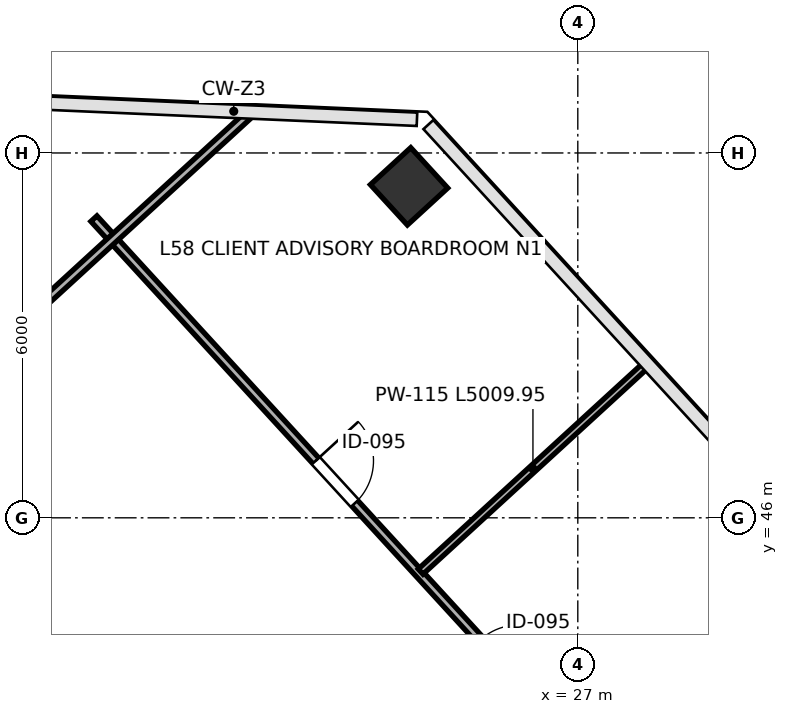
"""IFC4 building model, lengths in metres.
Left out: names, types, materials, properties, quantities, classifications, styles, units other than length and angle.
Written with IfcOpenShell. Run it as: python <this file> out.ifc"""

import sys

from ifc_helpers import new_model, si_unit, direction, frame, frame_2d, origin, origin_2d, place, context, subcontext, project, spatial, rectangle, extrude, source, transform, mapped, element, fill, save


model = new_model("IFC4")
c1 = context("Model", 3, precision=1e-05, world=origin(), true_north=direction((0.0, 1.0)))
c2 = subcontext(c1, "Body", "Model", "MODEL_VIEW")
j1 = project(units=[si_unit("LENGTHUNIT", "METRE"), si_unit("PLANEANGLEUNIT", "RADIAN")], contexts=[c1])
p1 = place(None, origin())
s1 = spatial("IfcSite", under=j1, at=p1, CompositionType="ELEMENT")
p2 = place(p1, origin())
s2 = spatial("IfcBuilding", under=s1, at=p2, CompositionType="ELEMENT")
p3 = place(p2, frame((0.0, 0.0, 258.4)))
s3 = spatial("IfcBuildingStorey", under=s2, at=p3, CompositionType="ELEMENT", Elevation=258.4)
m1 = source(origin(), c2, "Body", "SweptSolid", [
    extrude(rectangle(XDim=0.9, YDim=0.9, at=origin_2d()), origin(), (0.0, 0.0, 1.0), 4.199),
])
p4 = place(p3, frame((24.225, 51.451, 0.001), z_axis=(0.0, 0.0, 1.0), x_axis=(-0.675590207616, 0.73727733681, 0.0)))
e1 = element("IfcColumn", 1, at=p4, inside=s3, PredefinedType="COLUMN", context=c2, shape_type="MappedRepresentation", body=[
    mapped(m1, transform((0.0, 0.0, 0.0), scale=1.0)),
])
p5 = place(p3, frame((19.042, 50.92, 0.0), z_axis=(0.0, 0.0, 1.0), x_axis=(0.675589646996, -0.737277850523, 0.0)))
e2 = element("IfcWall", 2, at=p5, inside=s3, PredefinedType="PARTITIONING", context=c2, shape_type="SweptSolid", body=[
    extrude(rectangle(XDim=21.87, YDim=0.135, at=frame_2d((10.935, 0.0))), origin(), (0.0, 0.0, 1.0), 3.96),
])
p6 = place(p5, frame((5.4, 0.0, 0.0)))
e3 = element("IfcOpeningElement", 3, at=p6, cuts=e2, PredefinedType="OPENING", context=c2, shape_type="SweptSolid", body=[
    extrude(rectangle(XDim=0.95, YDim=2.15, at=frame_2d((0.475, 1.075))), frame((0.0, 0.078, 0.0), z_axis=(0.0, -1.0, 0.0), x_axis=(1.0, 0.0, 0.0)), (0.0, 0.0, 1.0), 0.155),
])
p7 = place(p5, frame((9.4, 0.0, 0.0)))
e4 = element("IfcOpeningElement", 4, at=p7, cuts=e2, PredefinedType="OPENING", context=c2, shape_type="SweptSolid", body=[
    extrude(rectangle(XDim=0.95, YDim=2.15, at=frame_2d((0.475, 1.075))), frame((0.0, 0.078, 0.0), z_axis=(0.0, -1.0, 0.0), x_axis=(1.0, 0.0, 0.0)), (0.0, 0.0, 1.0), 0.155),
])
p8 = place(p3, frame((24.415, 45.115, 0.0), z_axis=(0.0, 0.0, 1.0), x_axis=(0.737279537385, 0.675587806101, 0.0)))
e5 = element("IfcWall", 5, at=p8, inside=s3, PredefinedType="PARTITIONING", context=c2, shape_type="SweptSolid", body=[
    extrude(rectangle(XDim=5.01, YDim=0.115, at=frame_2d((2.505, 0.0))), origin(), (0.0, 0.0, 1.0), 3.295),
])
p9 = place(p3, frame((1.393, 34.124, 0.0), z_axis=(0.0, 0.0, 1.0), x_axis=(0.737274323436, 0.675593496121, 0.0)))
e6 = element("IfcWall", 6, at=p9, inside=s3, PredefinedType="PARTITIONING", context=c2, shape_type="SweptSolid", body=[
    extrude(rectangle(XDim=27.402, YDim=0.135, at=frame_2d((13.701, 0.0))), origin(), (0.0, 0.0, 1.0), 3.96),
])
m2 = source(origin(), c2, "Body", "SweptSolid", [
    extrude(rectangle(XDim=0.95, YDim=2.15, at=frame_2d((0.475, 1.075))), frame((0.0, 0.025, 0.0), z_axis=(0.0, -1.0, 0.0), x_axis=(1.0, 0.0, 0.0)), (0.0, 0.0, 1.0), 0.05),
])
p10 = place(p6, origin())
e7 = element("IfcDoor", 7, at=p10, inside=s3, OperationType="SINGLE_SWING_LEFT", PredefinedType="DOOR", context=c2, shape_type="MappedRepresentation", body=[
    mapped(m2, transform((0.0, 0.0, 0.0), scale=1.0)),
])
fill(e3, e7)
save(model, sys.argv[1])
